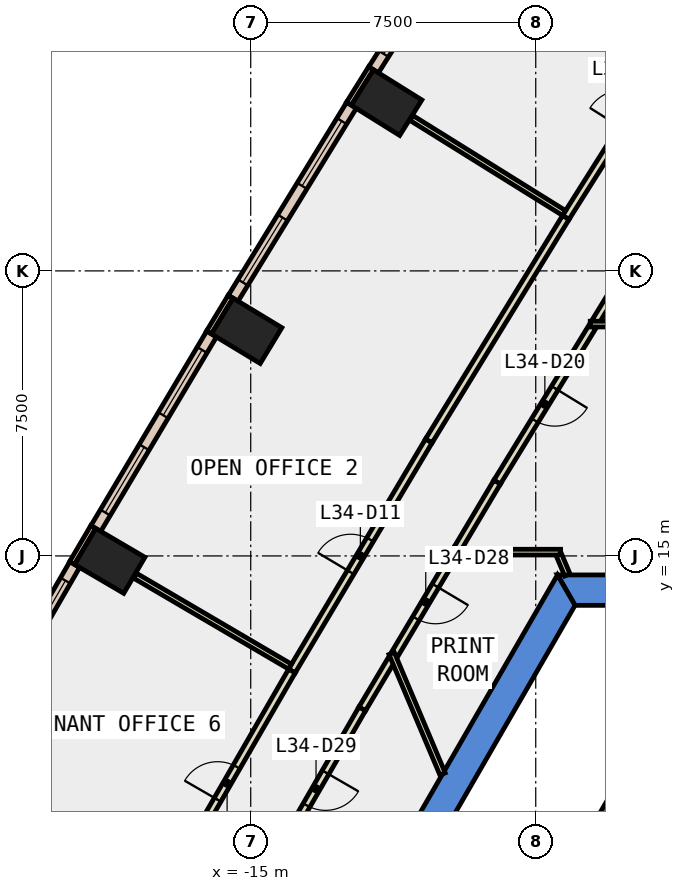
"""IFC4 building model, lengths in metres.
Left out: names, types, materials, properties, quantities, classifications, styles, units other than length and angle.
Written with IfcOpenShell. Run it as: python <this file> out.ifc"""

import sys

from ifc_helpers import new_model, si_unit, direction, frame, frame_2d, origin, origin_2d, place, context, subcontext, project, spatial, polyline, rectangle, outline, extrude, element, fill, save


model = new_model("IFC4")
c1 = context("Model", 3, precision=1e-05, world=origin(), true_north=direction((0.0, 1.0)))
c2 = subcontext(c1, "Body", "Model", "MODEL_VIEW")
j1 = project(units=[si_unit("LENGTHUNIT", "METRE"), si_unit("PLANEANGLEUNIT", "RADIAN")], contexts=[c1])
p1 = place(None, origin())
s1 = spatial("IfcSite", under=j1, at=p1, CompositionType="ELEMENT")
p2 = place(p1, origin())
s2 = spatial("IfcBuilding", under=s1, at=p2, CompositionType="ELEMENT")
p3 = place(p2, frame((0.0, 0.0, 155.0)))
s3 = spatial("IfcBuildingStorey", under=s2, at=p3, CompositionType="ELEMENT", Elevation=155.0)
for number, where, z_axis, x_axis in (
    (1, (-11.425, 26.928, -0.4), (0.0, 0.0, 1.0), (0.53, 0.848, 0.0)),
    (2, (-15.107, 20.923, -0.4), (0.0, 0.0, 1.0), (0.518, 0.855, 0.0)),
    (3, (-18.71, 14.87, -0.4), (0.0, 0.0, 1.0), (0.506, 0.863, 0.0)),
):
    element("IfcColumn", number, at=place(p3, frame(where, z_axis=z_axis, x_axis=x_axis)), inside=s3, PredefinedType="COLUMN", context=c2, shape_type="SweptSolid", body=[
        extrude(rectangle(XDim=1.1, YDim=1.5, at=origin_2d()), origin(), (0.0, 0.0, 1.0), 4.2),
    ])
p4 = place(p3, frame((0.0, 0.0, -0.4)))
e4 = element("IfcWall", 4, at=p4, inside=s3, PredefinedType="SHEAR", context=c2, shape_type="SweptSolid", body=[
    extrude(outline(polyline([(6.928, 14.5), (-6.928, 14.5), (-6.466, 13.7), (6.466, 13.7), (6.928, 14.5)])), origin(), (0.0, 0.0, 1.0), 4.2),
])
p5 = place(p3, frame((0.0, 0.0, -0.4)))
e5 = element("IfcWall", 5, at=p5, inside=s3, PredefinedType="SHEAR", context=c2, shape_type="SweptSolid", body=[
    extrude(outline(polyline([(-12.267, 5.252), (-11.575, 4.852), (-6.466, 13.7), (-6.928, 14.5), (-12.267, 5.252)])), origin(), (0.0, 0.0, 1.0), 4.2),
])
for number, where, z_axis, x_axis in (
    (6, (-11.833, 27.832, 0.0), (0.0, 0.0, 1.0), (-0.53, -0.848, 0.0)),
    (7, (-15.528, 21.821, 0.0), (0.0, 0.0, 1.0), (-0.518, -0.855, 0.0)),
):
    element("IfcWall", number, at=place(p3, frame(where, z_axis=z_axis, x_axis=x_axis)), inside=s3, PredefinedType="STANDARD", context=c2, shape_type="SweptSolid", body=[
        extrude(rectangle(XDim=1.1, YDim=0.15, at=frame_2d((0.55, 0.0))), origin(), (0.0, 0.0, 1.0), 3.8),
    ])
p6 = place(p3, frame((-19.143, 15.761, 0.0), z_axis=(0.0, 0.0, 1.0), x_axis=(-0.506505715302, -0.862236603472, 0.0)))
e8 = element("IfcWall", 8, at=p6, inside=s3, PredefinedType="STANDARD", context=c2, shape_type="SweptSolid", body=[
    extrude(rectangle(XDim=1.099, YDim=0.15, at=frame_2d((0.55, 0.0))), origin(), (0.0, 0.0, 1.0), 3.8),
])
p7 = place(p3, frame((-8.566, 32.855, 0.0), z_axis=(0.0, 0.0, 1.0), x_axis=(-0.534262775953, -0.845318452556, 0.0)))
e9 = element("IfcWall", 9, at=p7, inside=s3, PredefinedType="STANDARD", context=c2, shape_type="SweptSolid", body=[
    extrude(rectangle(XDim=5.992, YDim=0.3, at=frame_2d((2.996, 0.0))), origin(), (0.0, 0.0, 1.0), 3.8),
])
p8 = place(p7, frame((0.498, 0.0, 0.9)))
e10 = element("IfcOpeningElement", 10, at=p8, cuts=e9, PredefinedType="OPENING", context=c2, shape_type="SweptSolid", body=[
    extrude(rectangle(XDim=2.0, YDim=2.6, at=frame_2d((1.0, 1.3))), frame((0.0, 0.16, 0.0), z_axis=(0.0, -1.0, 0.0), x_axis=(1.0, 0.0, 0.0)), (0.0, 0.0, 1.0), 0.32),
])
p9 = place(p7, frame((3.494, 0.0, 0.9)))
e11 = element("IfcOpeningElement", 11, at=p9, cuts=e9, PredefinedType="OPENING", context=c2, shape_type="SweptSolid", body=[
    extrude(rectangle(XDim=2.0, YDim=2.6, at=frame_2d((1.0, 1.3))), frame((0.0, 0.16, 0.0), z_axis=(0.0, -1.0, 0.0), x_axis=(1.0, 0.0, 0.0)), (0.0, 0.0, 1.0), 0.32),
])
p10 = place(p3, frame((-12.348, 26.858, 0.0), z_axis=(0.0, 0.0, 1.0), x_axis=(-0.522704272908, -0.852514072074, 0.0)))
e12 = element("IfcWall", 12, at=p10, inside=s3, PredefinedType="STANDARD", context=c2, shape_type="SweptSolid", body=[
    extrude(rectangle(XDim=5.958, YDim=0.3, at=frame_2d((2.979, 0.0))), origin(), (0.0, 0.0, 1.0), 3.8),
])
p11 = place(p10, frame((0.489, 0.0, 0.9)))
e13 = element("IfcOpeningElement", 13, at=p11, cuts=e12, PredefinedType="OPENING", context=c2, shape_type="SweptSolid", body=[
    extrude(rectangle(XDim=2.0, YDim=2.6, at=frame_2d((1.0, 1.3))), frame((0.0, 0.16, 0.0), z_axis=(0.0, -1.0, 0.0), x_axis=(1.0, 0.0, 0.0)), (0.0, 0.0, 1.0), 0.32),
])
p12 = place(p10, frame((3.468, 0.0, 0.9)))
e14 = element("IfcOpeningElement", 14, at=p12, cuts=e12, PredefinedType="OPENING", context=c2, shape_type="SweptSolid", body=[
    extrude(rectangle(XDim=2.0, YDim=2.6, at=frame_2d((1.0, 1.3))), frame((0.0, 0.16, 0.0), z_axis=(0.0, -1.0, 0.0), x_axis=(1.0, 0.0, 0.0)), (0.0, 0.0, 1.0), 0.32),
])
p13 = place(p3, frame((-16.029, 20.84, 0.0), z_axis=(0.0, 0.0, 1.0), x_axis=(-0.511455040009, -0.859310038374, 0.0)))
e15 = element("IfcWall", 15, at=p13, inside=s3, PredefinedType="STANDARD", context=c2, shape_type="SweptSolid", body=[
    extrude(rectangle(XDim=5.957, YDim=0.3, at=frame_2d((2.979, 0.0))), origin(), (0.0, 0.0, 1.0), 3.8),
])
p14 = place(p13, frame((0.489, 0.0, 0.9)))
e16 = element("IfcOpeningElement", 16, at=p14, cuts=e15, PredefinedType="OPENING", context=c2, shape_type="SweptSolid", body=[
    extrude(rectangle(XDim=2.0, YDim=2.6, at=frame_2d((1.0, 1.3))), frame((0.0, 0.16, 0.0), z_axis=(0.0, -1.0, 0.0), x_axis=(1.0, 0.0, 0.0)), (0.0, 0.0, 1.0), 0.32),
])
p15 = place(p13, frame((3.468, 0.0, 0.9)))
e17 = element("IfcOpeningElement", 17, at=p15, cuts=e15, PredefinedType="OPENING", context=c2, shape_type="SweptSolid", body=[
    extrude(rectangle(XDim=2.0, YDim=2.6, at=frame_2d((1.0, 1.3))), frame((0.0, 0.16, 0.0), z_axis=(0.0, -1.0, 0.0), x_axis=(1.0, 0.0, 0.0)), (0.0, 0.0, 1.0), 0.32),
])
p16 = place(p3, frame((-19.631, 14.774, 0.0), z_axis=(0.0, 0.0, 1.0), x_axis=(-0.500061823953, -0.865989706766, 0.0)))
e18 = element("IfcWall", 18, at=p16, inside=s3, PredefinedType="STANDARD", context=c2, shape_type="SweptSolid", body=[
    extrude(rectangle(XDim=5.957, YDim=0.3, at=frame_2d((2.979, 0.0))), origin(), (0.0, 0.0, 1.0), 3.8),
])
p17 = place(p16, frame((0.489, 0.0, 0.9)))
e19 = element("IfcOpeningElement", 19, at=p17, cuts=e18, PredefinedType="OPENING", context=c2, shape_type="SweptSolid", body=[
    extrude(rectangle(XDim=2.0, YDim=2.6, at=frame_2d((1.0, 1.3))), frame((0.0, 0.16, 0.0), z_axis=(0.0, -1.0, 0.0), x_axis=(1.0, 0.0, 0.0)), (0.0, 0.0, 1.0), 0.32),
])
p18 = place(p16, frame((3.468, 0.0, 0.9)))
e20 = element("IfcOpeningElement", 20, at=p18, cuts=e18, PredefinedType="OPENING", context=c2, shape_type="SweptSolid", body=[
    extrude(rectangle(XDim=2.0, YDim=2.6, at=frame_2d((1.0, 1.3))), frame((0.0, 0.16, 0.0), z_axis=(0.0, -1.0, 0.0), x_axis=(1.0, 0.0, 0.0)), (0.0, 0.0, 1.0), 0.32),
])
p19 = place(p3, frame((-9.574, 15.164, 0.0), z_axis=(0.0, 0.0, 1.0), x_axis=(-0.511482522046, -0.859293680671, 0.0)))
e21 = element("IfcWall", 21, at=p19, inside=s3, PredefinedType="PARTITIONING", context=c2, shape_type="SweptSolid", body=[
    extrude(rectangle(XDim=3.208, YDim=0.2, at=frame_2d((1.604, 0.0))), origin(), (0.0, 0.0, 1.0), 3.8),
])
p20 = place(p19, frame((1.104, 0.0, 0.0)))
e22 = element("IfcOpeningElement", 22, at=p20, cuts=e21, PredefinedType="OPENING", context=c2, shape_type="SweptSolid", body=[
    extrude(rectangle(XDim=1.0, YDim=2.1, at=frame_2d((0.5, 1.05))), frame((0.0, 0.11, 0.0), z_axis=(0.0, -1.0, 0.0), x_axis=(1.0, 0.0, 0.0)), (0.0, 0.0, 1.0), 0.22),
])
p21 = place(p3, frame((-11.291, 12.278, 0.0), z_axis=(0.0, 0.0, 1.0), x_axis=(-0.511628198266, -0.859206952217, 0.0)))
e23 = element("IfcWall", 23, at=p21, inside=s3, PredefinedType="PARTITIONING", context=c2, shape_type="SweptSolid", body=[
    extrude(rectangle(XDim=1.517, YDim=0.2, at=frame_2d((0.758, 0.0))), origin(), (0.0, 0.0, 1.0), 3.8),
])
p22 = place(p3, frame((-12.067, 10.975, 0.0), z_axis=(0.0, 0.0, 1.0), x_axis=(-0.500215616273, -0.865900881878, 0.0)))
e24 = element("IfcWall", 24, at=p22, inside=s3, PredefinedType="PARTITIONING", context=c2, shape_type="SweptSolid", body=[
    extrude(rectangle(XDim=4.856, YDim=0.2, at=frame_2d((2.428, 0.0))), origin(), (0.0, 0.0, 1.0), 3.8),
])
p23 = place(p22, frame((1.928, 0.0, 0.0)))
e25 = element("IfcOpeningElement", 25, at=p23, cuts=e24, PredefinedType="OPENING", context=c2, shape_type="SweptSolid", body=[
    extrude(rectangle(XDim=1.0, YDim=2.1, at=frame_2d((0.5, 1.05))), frame((0.0, 0.11, 0.0), z_axis=(0.0, -1.0, 0.0), x_axis=(1.0, 0.0, 0.0)), (0.0, 0.0, 1.0), 0.22),
])
p24 = place(p3, frame((-6.005, 21.036, 0.0), z_axis=(0.0, 0.0, 1.0), x_axis=(-0.522865983217, -0.852414901086, 0.0)))
e26 = element("IfcWall", 26, at=p24, inside=s3, PredefinedType="PARTITIONING", context=c2, shape_type="SweptSolid", body=[
    extrude(rectangle(XDim=4.803, YDim=0.2, at=frame_2d((2.401, 0.0))), origin(), (0.0, 0.0, 1.0), 3.8),
])
p25 = place(p24, frame((1.901, 0.0, 0.0)))
e27 = element("IfcOpeningElement", 27, at=p25, cuts=e26, PredefinedType="OPENING", context=c2, shape_type="SweptSolid", body=[
    extrude(rectangle(XDim=1.0, YDim=2.1, at=frame_2d((0.5, 1.05))), frame((0.0, 0.11, 0.0), z_axis=(0.0, -1.0, 0.0), x_axis=(1.0, 0.0, 0.0)), (0.0, 0.0, 1.0), 0.22),
])
p26 = place(p3, frame((-8.516, 16.942, 0.0), z_axis=(0.0, 0.0, 1.0), x_axis=(-0.511351070319, -0.859371911854, 0.0)))
e28 = element("IfcWall", 28, at=p26, inside=s3, PredefinedType="PARTITIONING", context=c2, shape_type="SweptSolid", body=[
    extrude(rectangle(XDim=2.069, YDim=0.2, at=frame_2d((1.034, 0.0))), origin(), (0.0, 0.0, 1.0), 3.8),
])
p27 = place(p3, frame((-4.887, 22.86, 0.0), z_axis=(0.0, 0.0, 1.0), x_axis=(-0.522754838565, -0.852483066552, 0.0)))
e29 = element("IfcWall", 29, at=p27, inside=s3, PredefinedType="PARTITIONING", context=c2, shape_type="SweptSolid", body=[
    extrude(rectangle(XDim=1.99, YDim=0.2, at=frame_2d((0.995, 0.0))), origin(), (0.0, 0.0, 1.0), 3.8),
])
p28 = place(p3, frame((-6.71, 23.906, 0.0), z_axis=(0.0, 0.0, 1.0), x_axis=(0.534211624298, 0.845350779538, 0.0)))
e30 = element("IfcWall", 30, at=p28, inside=s3, PredefinedType="PARTITIONING", context=c2, shape_type="SweptSolid", body=[
    extrude(rectangle(XDim=6.553, YDim=0.2, at=frame_2d((3.277, 0.0))), origin(), (0.0, 0.0, 1.0), 3.8),
])
p29 = place(p28, frame((2.777, 0.0, 0.0)))
e31 = element("IfcOpeningElement", 31, at=p29, cuts=e30, PredefinedType="OPENING", context=c2, shape_type="SweptSolid", body=[
    extrude(rectangle(XDim=1.0, YDim=2.1, at=frame_2d((0.5, 1.05))), frame((0.0, 0.11, 0.0), z_axis=(0.0, -1.0, 0.0), x_axis=(1.0, 0.0, 0.0)), (0.0, 0.0, 1.0), 0.22),
])
p30 = place(p3, frame((-13.917, 11.973, 0.0), z_axis=(0.0, 0.0, 1.0), x_axis=(0.511455840413, 0.859309561978, 0.0)))
e32 = element("IfcWall", 32, at=p30, inside=s3, PredefinedType="PARTITIONING", context=c2, shape_type="SweptSolid", body=[
    extrude(rectangle(XDim=7.047, YDim=0.2, at=frame_2d((3.523, 0.0))), origin(), (0.0, 0.0, 1.0), 3.8),
])
p31 = place(p30, frame((3.023, 0.0, 0.0)))
e33 = element("IfcOpeningElement", 33, at=p31, cuts=e32, PredefinedType="OPENING", context=c2, shape_type="SweptSolid", body=[
    extrude(rectangle(XDim=1.0, YDim=2.1, at=frame_2d((0.5, 1.05))), frame((0.0, 0.11, 0.0), z_axis=(0.0, -1.0, 0.0), x_axis=(1.0, 0.0, 0.0)), (0.0, 0.0, 1.0), 0.22),
])
p32 = place(p3, frame((-10.313, 18.028, 0.0), z_axis=(0.0, 0.0, 1.0), x_axis=(0.522772968793, 0.85247194857, 0.0)))
e34 = element("IfcWall", 34, at=p32, inside=s3, PredefinedType="PARTITIONING", context=c2, shape_type="SweptSolid", body=[
    extrude(rectangle(XDim=6.894, YDim=0.2, at=frame_2d((3.447, 0.0))), origin(), (0.0, 0.0, 1.0), 3.8),
])
p33 = place(p3, frame((-17.402, 5.936, 0.0), z_axis=(0.0, 0.0, 1.0), x_axis=(0.500135788517, 0.865946992052, 0.0)))
e35 = element("IfcWall", 35, at=p33, inside=s3, PredefinedType="PARTITIONING", context=c2, shape_type="SweptSolid", body=[
    extrude(rectangle(XDim=6.97, YDim=0.2, at=frame_2d((3.485, 0.0))), origin(), (0.0, 0.0, 1.0), 3.8),
])
p34 = place(p33, frame((3.06, 0.0, 0.0)))
e36 = element("IfcOpeningElement", 36, at=p34, cuts=e35, PredefinedType="OPENING", context=c2, shape_type="SweptSolid", body=[
    extrude(rectangle(XDim=1.0, YDim=2.1, at=frame_2d((0.5, 1.05))), frame((0.0, 0.11, 0.0), z_axis=(0.0, -1.0, 0.0), x_axis=(1.0, 0.0, 0.0)), (0.0, 0.0, 1.0), 0.22),
])
p35 = place(p3, frame((-9.952, 9.262, 0.0), z_axis=(0.0, 0.0, 1.0), x_axis=(-0.38905491579, 0.921214563769, 0.0)))
e37 = element("IfcWall", 37, at=p35, inside=s3, PredefinedType="PARTITIONING", context=c2, shape_type="SweptSolid", body=[
    extrude(rectangle(XDim=3.445, YDim=0.15, at=frame_2d((1.722, 0.0))), origin(), (0.0, 0.0, 1.0), 3.8),
])
p36 = place(p3, frame((-6.846, 15.1, 0.0), z_axis=(0.0, 0.0, 1.0), x_axis=(-1.0, 0.0, 0.0)))
e38 = element("IfcWall", 38, at=p36, inside=s3, PredefinedType="PARTITIONING", context=c2, shape_type="SweptSolid", body=[
    extrude(rectangle(XDim=2.766, YDim=0.15, at=frame_2d((1.383, 0.0))), origin(), (0.0, 0.0, 1.0), 3.8),
])
p37 = place(p3, frame((-6.668, 14.5, 0.0), z_axis=(0.0, 0.0, 1.0), x_axis=(-0.388852201086, 0.921300149631, 0.0)))
e39 = element("IfcWall", 39, at=p37, inside=s3, PredefinedType="PARTITIONING", context=c2, shape_type="SweptSolid", body=[
    extrude(rectangle(XDim=0.576, YDim=0.15, at=frame_2d((0.288, 0.0))), origin(), (0.0, 0.0, 1.0), 3.8),
])
p38 = place(p3, frame((-6.066, 21.1, 0.0), z_axis=(0.0, 0.0, 1.0), x_axis=(1.0, 0.0, 0.0)))
e40 = element("IfcWall", 40, at=p38, inside=s3, PredefinedType="PARTITIONING", context=c2, shape_type="SweptSolid", body=[
    extrude(rectangle(XDim=5.666, YDim=0.15, at=frame_2d((2.833, 0.0))), origin(), (0.0, 0.0, 1.0), 3.8),
])
p39 = place(p3, frame((-6.755, 24.023, 0.0), z_axis=(0.0, 0.0, 1.0), x_axis=(-0.848896034983, 0.528559856392, 0.0)))
e41 = element("IfcWall", 41, at=p39, inside=s3, PredefinedType="PARTITIONING", context=c2, shape_type="SweptSolid", body=[
    extrude(rectangle(XDim=4.73, YDim=0.15, at=frame_2d((2.365, 0.0))), origin(), (0.0, 0.0, 1.0), 3.8),
])
p40 = place(p3, frame((-13.965, 12.088, 0.0), z_axis=(0.0, 0.0, 1.0), x_axis=(-0.862617990649, 0.50585591052, 0.0)))
e42 = element("IfcWall", 42, at=p40, inside=s3, PredefinedType="PARTITIONING", context=c2, shape_type="SweptSolid", body=[
    extrude(rectangle(XDim=4.731, YDim=0.15, at=frame_2d((2.365, 0.0))), origin(), (0.0, 0.0, 1.0), 3.8),
])
p41 = place(p3, frame((-17.451, 6.051, 0.0), z_axis=(0.0, 0.0, 1.0), x_axis=(-0.869409691741, 0.494091882049, 0.0)))
e43 = element("IfcWall", 43, at=p41, inside=s3, PredefinedType="PARTITIONING", context=c2, shape_type="SweptSolid", body=[
    extrude(rectangle(XDim=4.73, YDim=0.15, at=frame_2d((2.365, 0.0))), origin(), (0.0, 0.0, 1.0), 3.8),
])
p42 = place(p3, frame((-5.03, 9.388, 0.0), z_axis=(0.0, 0.0, 1.0), x_axis=(-0.499978703459, -0.866037698999, 0.0)))
e44 = element("IfcWall", 44, at=p42, inside=s3, PredefinedType="STANDARD", context=c2, shape_type="SweptSolid", body=[
    extrude(rectangle(XDim=6.9, YDim=0.2, at=frame_2d((3.45, 0.0))), origin(), (0.0, 0.0, 1.0), 3.8),
])
p43 = place(p9, origin())
e45 = element("IfcWindow", 45, at=p43, inside=s3, PartitioningType="SINGLE_PANEL", PredefinedType="WINDOW", context=c2, shape_type="SweptSolid", body=[
    extrude(rectangle(XDim=2.0, YDim=2.6, at=frame_2d((1.0, 1.3))), frame((0.0, 0.03, 0.0), z_axis=(0.0, -1.0, 0.0), x_axis=(1.0, 0.0, 0.0)), (0.0, 0.0, 1.0), 0.06),
])
fill(e11, e45)
p44 = place(p11, origin())
e46 = element("IfcWindow", 46, at=p44, inside=s3, PartitioningType="SINGLE_PANEL", PredefinedType="WINDOW", context=c2, shape_type="SweptSolid", body=[
    extrude(rectangle(XDim=2.0, YDim=2.6, at=frame_2d((1.0, 1.3))), frame((0.0, 0.03, 0.0), z_axis=(0.0, -1.0, 0.0), x_axis=(1.0, 0.0, 0.0)), (0.0, 0.0, 1.0), 0.06),
])
fill(e13, e46)
p45 = place(p12, origin())
e47 = element("IfcWindow", 47, at=p45, inside=s3, PartitioningType="SINGLE_PANEL", PredefinedType="WINDOW", context=c2, shape_type="SweptSolid", body=[
    extrude(rectangle(XDim=2.0, YDim=2.6, at=frame_2d((1.0, 1.3))), frame((0.0, 0.03, 0.0), z_axis=(0.0, -1.0, 0.0), x_axis=(1.0, 0.0, 0.0)), (0.0, 0.0, 1.0), 0.06),
])
fill(e14, e47)
p46 = place(p14, origin())
e48 = element("IfcWindow", 48, at=p46, inside=s3, PartitioningType="SINGLE_PANEL", PredefinedType="WINDOW", context=c2, shape_type="SweptSolid", body=[
    extrude(rectangle(XDim=2.0, YDim=2.6, at=frame_2d((1.0, 1.3))), frame((0.0, 0.03, 0.0), z_axis=(0.0, -1.0, 0.0), x_axis=(1.0, 0.0, 0.0)), (0.0, 0.0, 1.0), 0.06),
])
fill(e16, e48)
p47 = place(p15, origin())
e49 = element("IfcWindow", 49, at=p47, inside=s3, PartitioningType="SINGLE_PANEL", PredefinedType="WINDOW", context=c2, shape_type="SweptSolid", body=[
    extrude(rectangle(XDim=2.0, YDim=2.6, at=frame_2d((1.0, 1.3))), frame((0.0, 0.03, 0.0), z_axis=(0.0, -1.0, 0.0), x_axis=(1.0, 0.0, 0.0)), (0.0, 0.0, 1.0), 0.06),
])
fill(e17, e49)
p48 = place(p17, origin())
e50 = element("IfcWindow", 50, at=p48, inside=s3, PartitioningType="SINGLE_PANEL", PredefinedType="WINDOW", context=c2, shape_type="SweptSolid", body=[
    extrude(rectangle(XDim=2.0, YDim=2.6, at=frame_2d((1.0, 1.3))), frame((0.0, 0.03, 0.0), z_axis=(0.0, -1.0, 0.0), x_axis=(1.0, 0.0, 0.0)), (0.0, 0.0, 1.0), 0.06),
])
fill(e19, e50)
p49 = place(p31, origin())
e51 = element("IfcDoor", 51, at=p49, inside=s3, OperationType="SINGLE_SWING_LEFT", PredefinedType="DOOR", context=c2, shape_type="SweptSolid", body=[
    extrude(rectangle(XDim=1.0, YDim=2.1, at=frame_2d((0.5, 1.05))), frame((0.0, 0.025, 0.0), z_axis=(0.0, -1.0, 0.0), x_axis=(1.0, 0.0, 0.0)), (0.0, 0.0, 1.0), 0.05),
])
fill(e33, e51)
p50 = place(p34, origin())
e52 = element("IfcDoor", 52, at=p50, inside=s3, OperationType="SINGLE_SWING_LEFT", PredefinedType="DOOR", context=c2, shape_type="SweptSolid", body=[
    extrude(rectangle(XDim=1.0, YDim=2.1, at=frame_2d((0.5, 1.05))), frame((0.0, 0.025, 0.0), z_axis=(0.0, -1.0, 0.0), x_axis=(1.0, 0.0, 0.0)), (0.0, 0.0, 1.0), 0.05),
])
fill(e36, e52)
p51 = place(p25, origin())
e53 = element("IfcDoor", 53, at=p51, inside=s3, OperationType="SINGLE_SWING_LEFT", PredefinedType="DOOR", context=c2, shape_type="SweptSolid", body=[
    extrude(rectangle(XDim=1.0, YDim=2.1, at=frame_2d((0.5, 1.05))), frame((0.0, 0.025, 0.0), z_axis=(0.0, -1.0, 0.0), x_axis=(1.0, 0.0, 0.0)), (0.0, 0.0, 1.0), 0.05),
])
fill(e27, e53)
p52 = place(p20, origin())
e54 = element("IfcDoor", 54, at=p52, inside=s3, OperationType="SINGLE_SWING_RIGHT", PredefinedType="DOOR", context=c2, shape_type="SweptSolid", body=[
    extrude(rectangle(XDim=1.0, YDim=2.1, at=frame_2d((0.5, 1.05))), frame((0.0, 0.025, 0.0), z_axis=(0.0, -1.0, 0.0), x_axis=(1.0, 0.0, 0.0)), (0.0, 0.0, 1.0), 0.05),
])
fill(e22, e54)
p53 = place(p23, origin())
e55 = element("IfcDoor", 55, at=p53, inside=s3, OperationType="SINGLE_SWING_LEFT", PredefinedType="DOOR", context=c2, shape_type="SweptSolid", body=[
    extrude(rectangle(XDim=1.0, YDim=2.1, at=frame_2d((0.5, 1.05))), frame((0.0, 0.025, 0.0), z_axis=(0.0, -1.0, 0.0), x_axis=(1.0, 0.0, 0.0)), (0.0, 0.0, 1.0), 0.05),
])
fill(e25, e55)
save(model, sys.argv[1])
